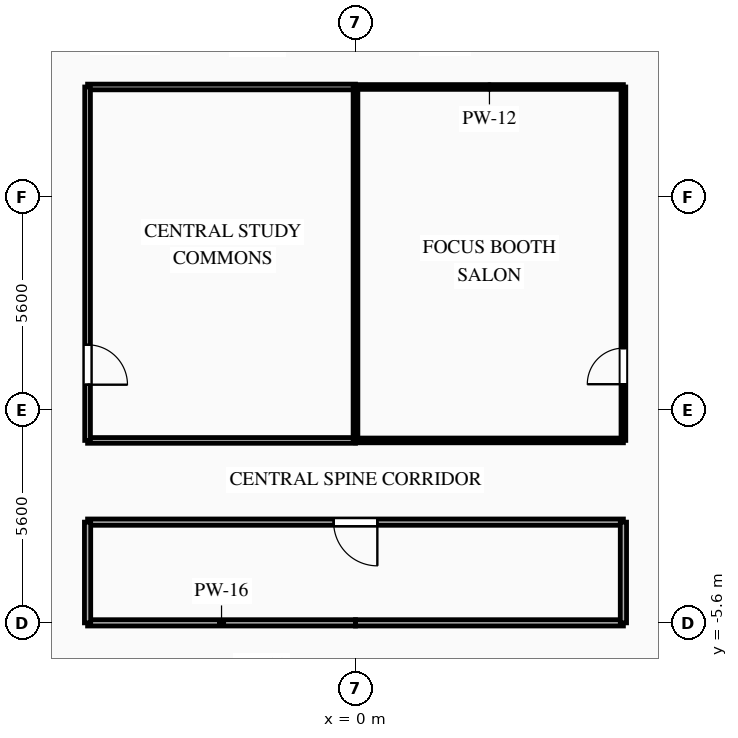
"""IFC4 building model, lengths in metres.
Left out: names, types, materials, properties, quantities, classifications, styles, units other than length and angle.
Written with IfcOpenShell. Run it as: python <this file> out.ifc"""

import sys

from ifc_helpers import new_model, si_unit, direction, frame, frame_2d, origin, place, context, subcontext, project, spatial, rectangle, extrude, element, fill, save


model = new_model("IFC4")
c1 = context("Model", 3, precision=1e-05, world=origin(), true_north=direction((0.0, 1.0)))
c2 = subcontext(c1, "Body", "Model", "MODEL_VIEW")
j1 = project(units=[si_unit("LENGTHUNIT", "METRE"), si_unit("PLANEANGLEUNIT", "RADIAN")], contexts=[c1])
p1 = place(None, origin())
s1 = spatial("IfcSite", under=j1, at=p1, CompositionType="ELEMENT")
p2 = place(p1, origin())
s2 = spatial("IfcBuilding", under=s1, at=p2, CompositionType="ELEMENT")
p3 = place(p2, frame((0.0, 0.0, 179.65)))
s3 = spatial("IfcBuildingStorey", under=s2, at=p3, CompositionType="ELEMENT", Elevation=179.65)
p4 = place(p3, frame((0.0, 8.5, 0.0), z_axis=(0.0, 0.0, 1.0), x_axis=(-1.0, 0.0, 0.0)))
e1 = element("IfcWall", 1, at=p4, inside=s3, PredefinedType="PARTITIONING", context=c2, shape_type="SweptSolid", body=[
    extrude(rectangle(XDim=7.05, YDim=0.15, at=frame_2d((3.525, 0.0))), origin(), (0.0, 0.0, 1.0), 3.04),
])
p5 = place(p3, frame((7.05, 8.5, 0.0), z_axis=(0.0, 0.0, 1.0), x_axis=(-1.0, 0.0, 0.0)))
e2 = element("IfcWall", 2, at=p5, inside=s3, PredefinedType="PARTITIONING", context=c2, shape_type="SweptSolid", body=[
    extrude(rectangle(XDim=7.05, YDim=0.125, at=frame_2d((3.525, 0.0))), origin(), (0.0, 0.0, 1.0), 3.04),
])
for number, where, z_axis, x_axis in (
    (3, (-7.05, -5.6, 0.0), (0.0, 0.0, 1.0), (1.0, 0.0, 0.0)),
    (4, (0.0, -5.6, 0.0), (0.0, 0.0, 1.0), (1.0, 0.0, 0.0)),
):
    element("IfcWall", number, at=place(p3, frame(where, z_axis=z_axis, x_axis=x_axis)), inside=s3, PredefinedType="PARTITIONING", context=c2, shape_type="SweptSolid", body=[
        extrude(rectangle(XDim=7.05, YDim=0.165, at=frame_2d((3.525, 0.0))), origin(), (0.0, 0.0, 1.0), 2.525),
    ])
p6 = place(p3, frame((-7.05, -0.8, 0.0), z_axis=(0.0, 0.0, 1.0), x_axis=(1.0, 0.0, 0.0)))
e5 = element("IfcWall", 5, at=p6, inside=s3, PredefinedType="PARTITIONING", context=c2, shape_type="SweptSolid", body=[
    extrude(rectangle(XDim=7.05, YDim=0.15, at=frame_2d((3.525, 0.0))), origin(), (0.0, 0.0, 1.0), 3.04),
])
p7 = place(p3, frame((0.0, -0.8, 0.0), z_axis=(0.0, 0.0, 1.0), x_axis=(1.0, 0.0, 0.0)))
e6 = element("IfcWall", 6, at=p7, inside=s3, PredefinedType="PARTITIONING", context=c2, shape_type="SweptSolid", body=[
    extrude(rectangle(XDim=7.05, YDim=0.125, at=frame_2d((3.525, 0.0))), origin(), (0.0, 0.0, 1.0), 3.04),
])
p8 = place(p3, frame((7.05, -2.95, 0.0), z_axis=(0.0, 0.0, 1.0), x_axis=(-1.0, 0.0, 0.0)))
e7 = element("IfcWall", 7, at=p8, inside=s3, PredefinedType="PARTITIONING", context=c2, shape_type="SweptSolid", body=[
    extrude(rectangle(XDim=14.1, YDim=0.165, at=frame_2d((7.05, 0.0))), origin(), (0.0, 0.0, 1.0), 3.04),
])
p9 = place(p8, frame((6.475, 0.0, 0.0)))
e8 = element("IfcOpeningElement", 8, at=p9, cuts=e7, PredefinedType="OPENING", context=c2, shape_type="SweptSolid", body=[
    extrude(rectangle(XDim=1.15, YDim=2.15, at=frame_2d((0.575, 1.075))), frame((0.0, 0.093, 0.0), z_axis=(0.0, -1.0, 0.0), x_axis=(1.0, 0.0, 0.0)), (0.0, 0.0, 1.0), 0.185),
])
p10 = place(p3, frame((-7.05, 8.5, 0.0), z_axis=(0.0, 0.0, 1.0), x_axis=(0.0, -1.0, 0.0)))
e9 = element("IfcWall", 9, at=p10, inside=s3, PredefinedType="PARTITIONING", context=c2, shape_type="SweptSolid", body=[
    extrude(rectangle(XDim=9.3, YDim=0.15, at=frame_2d((4.65, 0.0))), origin(), (0.0, 0.0, 1.0), 3.04),
])
p11 = place(p10, frame((6.784, 0.0, 0.0)))
e10 = element("IfcOpeningElement", 10, at=p11, cuts=e9, PredefinedType="OPENING", context=c2, shape_type="SweptSolid", body=[
    extrude(rectangle(XDim=1.05, YDim=2.15, at=frame_2d((0.525, 1.075))), frame((0.0, 0.085, 0.0), z_axis=(0.0, -1.0, 0.0), x_axis=(1.0, 0.0, 0.0)), (0.0, 0.0, 1.0), 0.17),
])
p12 = place(p3, frame((-7.05, -2.95, 0.0), z_axis=(0.0, 0.0, 1.0), x_axis=(0.0, -1.0, 0.0)))
e11 = element("IfcWall", 11, at=p12, inside=s3, PredefinedType="PARTITIONING", context=c2, shape_type="SweptSolid", body=[
    extrude(rectangle(XDim=2.65, YDim=0.165, at=frame_2d((1.325, 0.0))), origin(), (0.0, 0.0, 1.0), 3.04),
])
p13 = place(p3, frame((7.05, -0.8, 0.0), z_axis=(0.0, 0.0, 1.0), x_axis=(0.0, 1.0, 0.0)))
e12 = element("IfcWall", 12, at=p13, inside=s3, PredefinedType="PARTITIONING", context=c2, shape_type="SweptSolid", body=[
    extrude(rectangle(XDim=9.3, YDim=0.125, at=frame_2d((4.65, 0.0))), origin(), (0.0, 0.0, 1.0), 3.04),
])
p14 = place(p13, frame((1.479, 0.0, 0.0)))
e13 = element("IfcOpeningElement", 13, at=p14, cuts=e12, PredefinedType="OPENING", context=c2, shape_type="SweptSolid", body=[
    extrude(rectangle(XDim=0.95, YDim=2.1, at=frame_2d((0.475, 1.05))), frame((0.0, 0.073, 0.0), z_axis=(0.0, -1.0, 0.0), x_axis=(1.0, 0.0, 0.0)), (0.0, 0.0, 1.0), 0.145),
])
p15 = place(p3, frame((7.05, -5.6, 0.0), z_axis=(0.0, 0.0, 1.0), x_axis=(0.0, 1.0, 0.0)))
e14 = element("IfcWall", 14, at=p15, inside=s3, PredefinedType="PARTITIONING", context=c2, shape_type="SweptSolid", body=[
    extrude(rectangle(XDim=2.65, YDim=0.165, at=frame_2d((1.325, 0.0))), origin(), (0.0, 0.0, 1.0), 3.04),
])
p16 = place(p3, frame((0.0, 8.5, 0.0), z_axis=(0.0, 0.0, 1.0), x_axis=(0.0, -1.0, 0.0)))
e15 = element("IfcWall", 15, at=p16, inside=s3, PredefinedType="PARTITIONING", context=c2, shape_type="SweptSolid", body=[
    extrude(rectangle(XDim=9.3, YDim=0.125, at=frame_2d((4.65, 0.0))), origin(), (0.0, 0.0, 1.0), 3.04),
])
p17 = place(p9, origin())
e16 = element("IfcDoor", 16, at=p17, inside=s3, OperationType="SINGLE_SWING_LEFT", PredefinedType="DOOR", context=c2, shape_type="SweptSolid", body=[
    extrude(rectangle(XDim=1.15, YDim=2.15, at=frame_2d((0.575, 1.075))), frame((0.0, 0.025, 0.0), z_axis=(0.0, -1.0, 0.0), x_axis=(1.0, 0.0, 0.0)), (0.0, 0.0, 1.0), 0.05),
])
fill(e8, e16)
p18 = place(p11, origin())
e17 = element("IfcDoor", 17, at=p18, inside=s3, OperationType="SINGLE_SWING_RIGHT", PredefinedType="DOOR", context=c2, shape_type="SweptSolid", body=[
    extrude(rectangle(XDim=1.05, YDim=2.15, at=frame_2d((0.525, 1.075))), frame((0.0, 0.025, 0.0), z_axis=(0.0, -1.0, 0.0), x_axis=(1.0, 0.0, 0.0)), (0.0, 0.0, 1.0), 0.05),
])
fill(e10, e17)
p19 = place(p14, origin())
e18 = element("IfcDoor", 18, at=p19, inside=s3, OperationType="SINGLE_SWING_LEFT", PredefinedType="DOOR", context=c2, shape_type="SweptSolid", body=[
    extrude(rectangle(XDim=0.95, YDim=2.1, at=frame_2d((0.475, 1.05))), frame((0.0, 0.025, 0.0), z_axis=(0.0, -1.0, 0.0), x_axis=(1.0, 0.0, 0.0)), (0.0, 0.0, 1.0), 0.05),
])
fill(e13, e18)
save(model, sys.argv[1])
